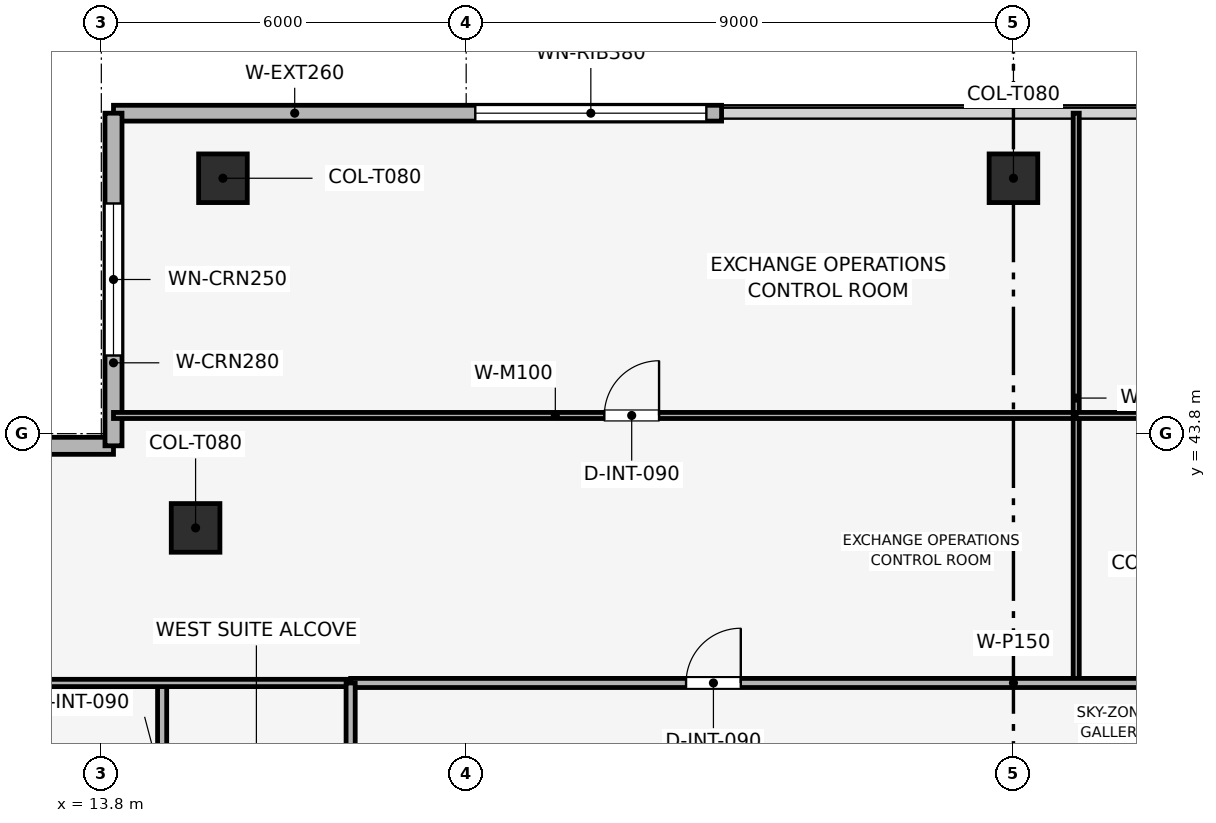
"""IFC4 building model, lengths in metres.
Left out: names, types, materials, properties, quantities, classifications, styles, units other than length and angle.
Written with IfcOpenShell. Run it as: python <this file> out.ifc"""

import sys

from ifc_helpers import new_model, si_unit, direction, frame, frame_2d, origin, origin_2d, place, context, subcontext, project, spatial, rectangle, extrude, element, fill, save


model = new_model("IFC4")
c1 = context("Model", 3, precision=1e-05, world=origin(), true_north=direction((0.0, 1.0)))
c2 = subcontext(c1, "Body", "Model", "MODEL_VIEW")
j1 = project(units=[si_unit("LENGTHUNIT", "METRE"), si_unit("PLANEANGLEUNIT", "RADIAN")], contexts=[c1])
p1 = place(None, origin())
s1 = spatial("IfcSite", under=j1, at=p1, CompositionType="ELEMENT")
p2 = place(p1, origin())
s2 = spatial("IfcBuilding", under=s1, at=p2, CompositionType="ELEMENT")
p3 = place(p2, frame((0.0, 0.0, 360.0)))
s3 = spatial("IfcBuildingStorey", under=s2, at=p3, CompositionType="ELEMENT", Elevation=360.0)
for number, where, z_axis, x_axis in (
    (1, (28.8, 48.0, 0.003), (0.0, 0.0, 1.0), (1.0, 0.0, 0.0)),
    (2, (15.8, 48.0, 0.003), (0.0, 0.0, 1.0), (1.0, 0.0, 0.0)),
    (3, (15.35, 42.25, 0.003), (0.0, 0.0, 1.0), (1.0, 0.0, 0.0)),
):
    element("IfcColumn", number, at=place(p3, frame(where, z_axis=z_axis, x_axis=x_axis)), inside=s3, PredefinedType="COLUMN", context=c2, shape_type="SweptSolid", body=[
        extrude(rectangle(XDim=0.8, YDim=0.8, at=origin_2d()), origin(), (0.0, 0.0, 1.0), 4.234),
    ])
p4 = place(p3, frame((14.0, 49.07, 0.0), z_axis=(0.0, 0.0, 1.0), x_axis=(1.0, 0.0, 0.0)))
e4 = element("IfcWall", 4, at=p4, inside=s3, PredefinedType="SOLIDWALL", context=c2, shape_type="SweptSolid", body=[
    extrude(rectangle(XDim=10.0, YDim=0.26, at=frame_2d((5.0, 0.0))), origin(), (0.0, 0.0, 1.0), 4.24),
])
p5 = place(p4, frame((5.95, 0.0, 0.9)))
e5 = element("IfcOpeningElement", 5, at=p5, cuts=e4, PredefinedType="OPENING", context=c2, shape_type="SweptSolid", body=[
    extrude(rectangle(XDim=3.8, YDim=1.9, at=frame_2d((1.9, 0.95))), frame((0.0, 0.14, 0.0), z_axis=(0.0, -1.0, 0.0), x_axis=(1.0, 0.0, 0.0)), (0.0, 0.0, 1.0), 0.28),
])
p6 = place(p3, frame((8.53, 43.6, 0.0), z_axis=(0.0, 0.0, 1.0), x_axis=(1.0, 0.0, 0.0)))
e6 = element("IfcWall", 6, at=p6, inside=s3, PredefinedType="SOLIDWALL", context=c2, shape_type="SweptSolid", body=[
    extrude(rectangle(XDim=5.47, YDim=0.28, at=frame_2d((2.735, 0.0))), origin(), (0.0, 0.0, 1.0), 4.24),
])
p7 = place(p6, frame((1.485, 0.0, 0.9)))
e7 = element("IfcOpeningElement", 7, at=p7, cuts=e6, PredefinedType="OPENING", context=c2, shape_type="SweptSolid", body=[
    extrude(rectangle(XDim=2.5, YDim=1.9, at=frame_2d((1.25, 0.95))), frame((0.0, 0.15, 0.0), z_axis=(0.0, -1.0, 0.0), x_axis=(1.0, 0.0, 0.0)), (0.0, 0.0, 1.0), 0.3),
])
p8 = place(p3, frame((14.0, 43.6, 0.0), z_axis=(0.0, 0.0, 1.0), x_axis=(0.0, 1.0, 0.0)))
e8 = element("IfcWall", 8, at=p8, inside=s3, PredefinedType="SOLIDWALL", context=c2, shape_type="SweptSolid", body=[
    extrude(rectangle(XDim=5.47, YDim=0.28, at=frame_2d((2.735, 0.0))), origin(), (0.0, 0.0, 1.0), 4.24),
])
p9 = place(p8, frame((1.485, 0.0, 0.9)))
e9 = element("IfcOpeningElement", 9, at=p9, cuts=e8, PredefinedType="OPENING", context=c2, shape_type="SweptSolid", body=[
    extrude(rectangle(XDim=2.5, YDim=1.9, at=frame_2d((1.25, 0.95))), frame((0.0, 0.15, 0.0), z_axis=(0.0, -1.0, 0.0), x_axis=(1.0, 0.0, 0.0)), (0.0, 0.0, 1.0), 0.3),
])
p10 = place(p3, frame((14.0, 44.099, 0.0), z_axis=(0.0, 0.0, 1.0), x_axis=(1.0, 0.0, 0.0)))
e10 = element("IfcWall", 10, at=p10, inside=s3, PredefinedType="MOVABLE", context=c2, shape_type="SweptSolid", body=[
    extrude(rectangle(XDim=15.832, YDim=0.1, at=frame_2d((7.916, 0.0))), origin(), (0.0, 0.0, 1.0), 3.825),
])
p11 = place(p10, frame((8.072, 0.0, 0.0)))
e11 = element("IfcOpeningElement", 11, at=p11, cuts=e10, PredefinedType="OPENING", context=c2, shape_type="SweptSolid", body=[
    extrude(rectangle(XDim=0.9, YDim=2.1, at=frame_2d((0.45, 1.05))), frame((0.0, 0.06, 0.0), z_axis=(0.0, -1.0, 0.0), x_axis=(1.0, 0.0, 0.0)), (0.0, 0.0, 1.0), 0.12),
])
p12 = place(p3, frame((29.832, 39.7, 0.0), z_axis=(0.0, 0.0, 1.0), x_axis=(0.0, 1.0, 0.0)))
e12 = element("IfcWall", 12, at=p12, inside=s3, PredefinedType="MOVABLE", context=c2, shape_type="SweptSolid", body=[
    extrude(rectangle(XDim=9.37, YDim=0.1, at=frame_2d((4.685, 0.0))), origin(), (0.0, 0.0, 1.0), 3.865),
])
p13 = place(p3, frame((29.832, 44.099, 0.0), z_axis=(0.0, 0.0, 1.0), x_axis=(1.0, 0.0, 0.0)))
e13 = element("IfcWall", 13, at=p13, inside=s3, PredefinedType="MOVABLE", context=c2, shape_type="SweptSolid", body=[
    extrude(rectangle(XDim=13.768, YDim=0.1, at=frame_2d((6.884, 0.0))), origin(), (0.0, 0.0, 1.0), 3.825),
])
p14 = place(p13, frame((4.876, 0.0, 0.0)))
e14 = element("IfcOpeningElement", 14, at=p14, cuts=e13, PredefinedType="OPENING", context=c2, shape_type="SweptSolid", body=[
    extrude(rectangle(XDim=0.9, YDim=2.1, at=frame_2d((0.45, 1.05))), frame((0.0, 0.06, 0.0), z_axis=(0.0, -1.0, 0.0), x_axis=(1.0, 0.0, 0.0)), (0.0, 0.0, 1.0), 0.12),
])
p15 = place(p3, frame((14.8, 28.0, 0.0), z_axis=(0.0, 0.0, 1.0), x_axis=(0.0, 1.0, 0.0)))
e15 = element("IfcWall", 15, at=p15, inside=s3, PredefinedType="PARTITIONING", context=c2, shape_type="SweptSolid", body=[
    extrude(rectangle(XDim=11.7, YDim=0.15, at=frame_2d((5.85, 0.0))), origin(), (0.0, 0.0, 1.0), 3.825),
])
p16 = place(p15, frame((9.6, 0.0, 0.0)))
e16 = element("IfcOpeningElement", 16, at=p16, cuts=e15, PredefinedType="OPENING", context=c2, shape_type="SweptSolid", body=[
    extrude(rectangle(XDim=0.9, YDim=2.1, at=frame_2d((0.45, 1.05))), frame((0.0, 0.085, 0.0), z_axis=(0.0, -1.0, 0.0), x_axis=(1.0, 0.0, 0.0)), (0.0, 0.0, 1.0), 0.17),
])
p17 = place(p3, frame((8.53, 39.7, 0.0), z_axis=(0.0, 0.0, 1.0), x_axis=(1.0, 0.0, 0.0)))
e17 = element("IfcWall", 17, at=p17, inside=s3, PredefinedType="PARTITIONING", context=c2, shape_type="SweptSolid", body=[
    extrude(rectangle(XDim=9.37, YDim=0.12, at=frame_2d((4.685, 0.0))), origin(), (0.0, 0.0, 1.0), 3.825),
])
p18 = place(p3, frame((17.9, 39.7, 0.0), z_axis=(0.0, 0.0, 1.0), x_axis=(1.0, 0.0, 0.0)))
e18 = element("IfcWall", 18, at=p18, inside=s3, PredefinedType="PARTITIONING", context=c2, shape_type="SweptSolid", body=[
    extrude(rectangle(XDim=21.8, YDim=0.15, at=frame_2d((10.9, 0.0))), origin(), (0.0, 0.0, 1.0), 3.825),
])
p19 = place(p18, frame((5.516, 0.0, 0.0)))
e19 = element("IfcOpeningElement", 19, at=p19, cuts=e18, PredefinedType="OPENING", context=c2, shape_type="SweptSolid", body=[
    extrude(rectangle(XDim=0.9, YDim=2.1, at=frame_2d((0.45, 1.05))), frame((0.0, 0.085, 0.0), z_axis=(0.0, -1.0, 0.0), x_axis=(1.0, 0.0, 0.0)), (0.0, 0.0, 1.0), 0.17),
])
p20 = place(p18, frame((16.416, 0.0, 0.0)))
e20 = element("IfcOpeningElement", 20, at=p20, cuts=e18, PredefinedType="OPENING", context=c2, shape_type="SweptSolid", body=[
    extrude(rectangle(XDim=0.9, YDim=2.1, at=frame_2d((0.45, 1.05))), frame((0.0, 0.085, 0.0), z_axis=(0.0, -1.0, 0.0), x_axis=(1.0, 0.0, 0.0)), (0.0, 0.0, 1.0), 0.17),
])
p21 = place(p3, frame((17.9, 14.0, 0.0), z_axis=(0.0, 0.0, 1.0), x_axis=(0.0, 1.0, 0.0)))
e21 = element("IfcWall", 21, at=p21, inside=s3, PredefinedType="PARTITIONING", context=c2, shape_type="SweptSolid", body=[
    extrude(rectangle(XDim=25.7, YDim=0.15, at=frame_2d((12.85, 0.0))), origin(), (0.0, 0.0, 1.0), 3.825),
])
p22 = place(p21, frame((6.55, 0.0, 0.0)))
e22 = element("IfcOpeningElement", 22, at=p22, cuts=e21, PredefinedType="OPENING", context=c2, shape_type="SweptSolid", body=[
    extrude(rectangle(XDim=0.9, YDim=2.1, at=frame_2d((0.45, 1.05))), frame((0.0, 0.085, 0.0), z_axis=(0.0, -1.0, 0.0), x_axis=(1.0, 0.0, 0.0)), (0.0, 0.0, 1.0), 0.17),
])
p23 = place(p21, frame((14.95, 0.0, 0.0)))
e23 = element("IfcOpeningElement", 23, at=p23, cuts=e21, PredefinedType="OPENING", context=c2, shape_type="SweptSolid", body=[
    extrude(rectangle(XDim=0.9, YDim=2.1, at=frame_2d((0.45, 1.05))), frame((0.0, 0.085, 0.0), z_axis=(0.0, -1.0, 0.0), x_axis=(1.0, 0.0, 0.0)), (0.0, 0.0, 1.0), 0.17),
])
p24 = place(p21, frame((17.85, 0.0, 0.0)))
e24 = element("IfcOpeningElement", 24, at=p24, cuts=e21, PredefinedType="OPENING", context=c2, shape_type="SweptSolid", body=[
    extrude(rectangle(XDim=0.9, YDim=2.1, at=frame_2d((0.45, 1.05))), frame((0.0, 0.085, 0.0), z_axis=(0.0, -1.0, 0.0), x_axis=(1.0, 0.0, 0.0)), (0.0, 0.0, 1.0), 0.17),
])
p25 = place(p21, frame((20.6, 0.0, 0.0)))
e25 = element("IfcOpeningElement", 25, at=p25, cuts=e21, PredefinedType="OPENING", context=c2, shape_type="SweptSolid", body=[
    extrude(rectangle(XDim=0.95, YDim=2.1, at=frame_2d((0.475, 1.05))), frame((0.0, 0.085, 0.0), z_axis=(0.0, -1.0, 0.0), x_axis=(1.0, 0.0, 0.0)), (0.0, 0.0, 1.0), 0.17),
])
p26 = place(p21, frame((23.6, 0.0, 0.0)))
e26 = element("IfcOpeningElement", 26, at=p26, cuts=e21, PredefinedType="OPENING", context=c2, shape_type="SweptSolid", body=[
    extrude(rectangle(XDim=0.9, YDim=2.1, at=frame_2d((0.45, 1.05))), frame((0.0, 0.085, 0.0), z_axis=(0.0, -1.0, 0.0), x_axis=(1.0, 0.0, 0.0)), (0.0, 0.0, 1.0), 0.17),
])
p27 = place(p5, origin())
e27 = element("IfcWindow", 27, at=p27, inside=s3, PartitioningType="SINGLE_PANEL", PredefinedType="WINDOW", context=c2, shape_type="SweptSolid", body=[
    extrude(rectangle(XDim=3.8, YDim=1.9, at=frame_2d((1.9, 0.95))), frame((0.0, 0.03, 0.0), z_axis=(0.0, -1.0, 0.0), x_axis=(1.0, 0.0, 0.0)), (0.0, 0.0, 1.0), 0.06),
])
fill(e5, e27)
p28 = place(p9, origin())
e28 = element("IfcWindow", 28, at=p28, inside=s3, PartitioningType="SINGLE_PANEL", PredefinedType="WINDOW", context=c2, shape_type="SweptSolid", body=[
    extrude(rectangle(XDim=2.5, YDim=1.9, at=frame_2d((1.25, 0.95))), frame((0.0, 0.03, 0.0), z_axis=(0.0, -1.0, 0.0), x_axis=(1.0, 0.0, 0.0)), (0.0, 0.0, 1.0), 0.06),
])
fill(e9, e28)
p29 = place(p11, origin())
e29 = element("IfcDoor", 29, at=p29, inside=s3, OperationType="SINGLE_SWING_RIGHT", PredefinedType="DOOR", context=c2, shape_type="SweptSolid", body=[
    extrude(rectangle(XDim=0.9, YDim=2.1, at=frame_2d((0.45, 1.05))), frame((0.0, 0.025, 0.0), z_axis=(0.0, -1.0, 0.0), x_axis=(1.0, 0.0, 0.0)), (0.0, 0.0, 1.0), 0.05),
])
fill(e11, e29)
p30 = place(p19, origin())
e30 = element("IfcDoor", 30, at=p30, inside=s3, OperationType="SINGLE_SWING_RIGHT", PredefinedType="DOOR", context=c2, shape_type="SweptSolid", body=[
    extrude(rectangle(XDim=0.9, YDim=2.1, at=frame_2d((0.45, 1.05))), frame((0.0, 0.025, 0.0), z_axis=(0.0, -1.0, 0.0), x_axis=(1.0, 0.0, 0.0)), (0.0, 0.0, 1.0), 0.05),
])
fill(e19, e30)
save(model, sys.argv[1])
